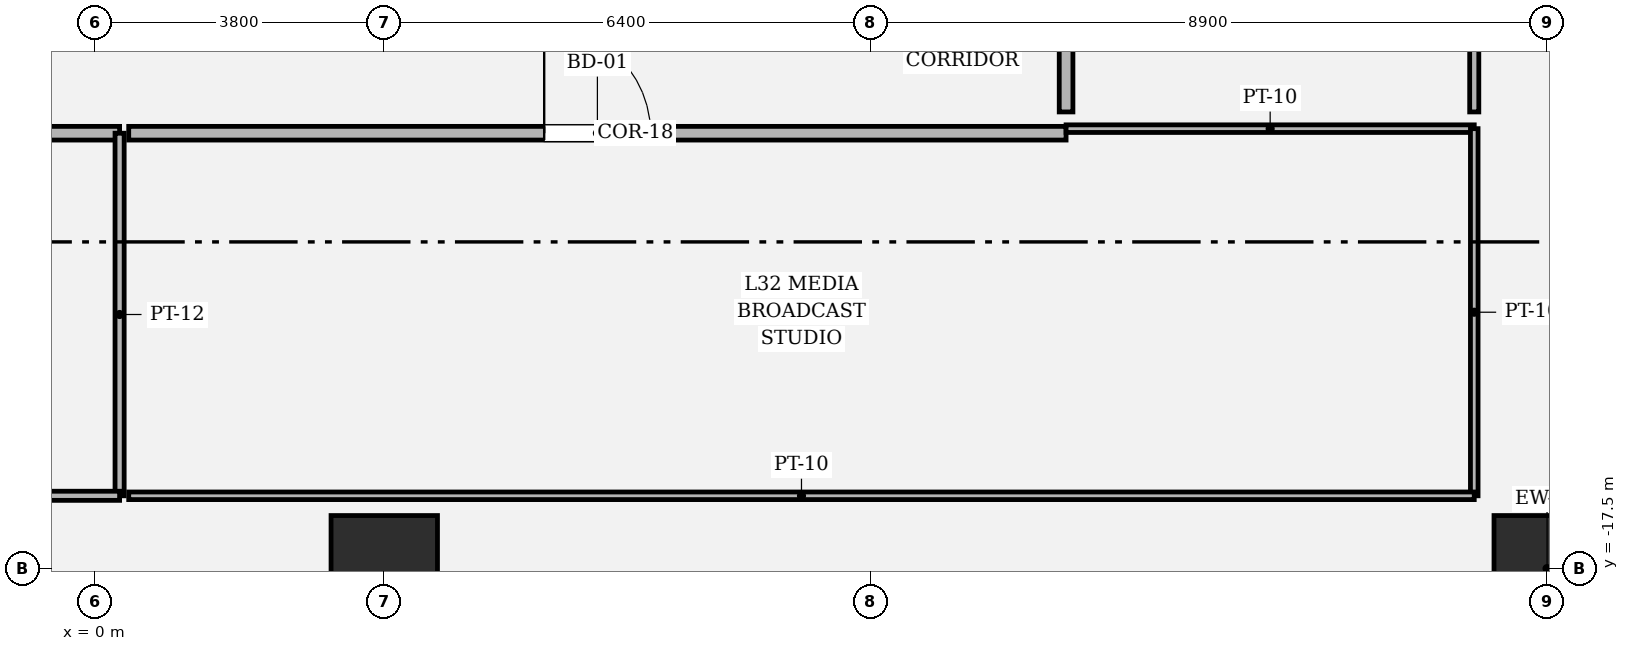
"""IFC4 building model, lengths in metres.
Left out: names, types, materials, properties, quantities, classifications, styles, units other than length and angle.
Written with IfcOpenShell. Run it as: python <this file> out.ifc"""

import sys

from ifc_helpers import new_model, si_unit, direction, frame, frame_2d, origin, origin_2d, place, context, subcontext, project, spatial, rectangle, hollow_rectangle, extrude, element, fill, save


model = new_model("IFC4")
c1 = context("Model", 3, precision=1e-05, world=origin(), true_north=direction((0.0, 1.0)))
c2 = subcontext(c1, "Body", "Model", "MODEL_VIEW")
j1 = project(units=[si_unit("LENGTHUNIT", "METRE"), si_unit("PLANEANGLEUNIT", "RADIAN")], contexts=[c1])
p1 = place(None, origin())
s1 = spatial("IfcSite", under=j1, at=p1, CompositionType="ELEMENT")
p2 = place(p1, origin())
s2 = spatial("IfcBuilding", under=s1, at=p2, CompositionType="ELEMENT")
p3 = place(p2, frame((0.0, 0.0, 139.8)))
s3 = spatial("IfcBuildingStorey", under=s2, at=p3, CompositionType="ELEMENT", Elevation=139.8)
for number, where, z_axis, x_axis in (
    (1, (3.8, -17.5, 0.0), (0.0, 0.0, 1.0), (1.0, 0.0, 0.0)),
    (2, (19.1, -17.5, 0.0), (0.0, 0.0, 1.0), (1.0, 0.0, 0.0)),
):
    element("IfcColumn", number, at=place(p3, frame(where, z_axis=z_axis, x_axis=x_axis)), inside=s3, PredefinedType="COLUMN", context=c2, shape_type="SweptSolid", body=[
        extrude(hollow_rectangle(XDim=1.4, YDim=1.4, WallThickness=0.042, at=origin_2d()), origin(), (0.0, 0.0, 1.0), 4.05),
    ])
p4 = place(p3, frame((18.549, -18.047, 0.0), z_axis=(0.0, 0.0, 1.0), x_axis=(0.707106781187, 0.707106781187, 0.0)))
e3 = element("IfcWall", 3, at=p4, inside=s3, PredefinedType="SOLIDWALL", context=c2, shape_type="SweptSolid", body=[
    extrude(rectangle(XDim=1.552, YDim=0.32, at=frame_2d((0.776, 0.0))), origin(), (0.0, 0.0, 1.0), 3.174),
])
p5 = place(p3, frame((-12.77, -11.77, 0.0), z_axis=(0.0, 0.0, 1.0), x_axis=(1.0, 0.0, 0.0)))
e4 = element("IfcWall", 4, at=p5, inside=s3, PredefinedType="PARTITIONING", context=c2, shape_type="SweptSolid", body=[
    extrude(rectangle(XDim=13.088, YDim=0.18, at=frame_2d((6.544, 0.0))), origin(), (0.0, 0.0, 1.0), 3.174),
])
p6 = place(p5, frame((6.019, 0.0, 0.0)))
e5 = element("IfcOpeningElement", 5, at=p6, cuts=e4, PredefinedType="OPENING", context=c2, shape_type="SweptSolid", body=[
    extrude(rectangle(XDim=1.05, YDim=2.2, at=frame_2d((0.525, 1.1))), frame((0.0, 0.1, 0.0), z_axis=(0.0, -1.0, 0.0), x_axis=(1.0, 0.0, 0.0)), (0.0, 0.0, 1.0), 0.2),
])
p7 = place(p3, frame((0.318, -11.77, 0.0), z_axis=(0.0, 0.0, 1.0), x_axis=(0.0, -1.0, 0.0)))
e6 = element("IfcWall", 6, at=p7, inside=s3, PredefinedType="PARTITIONING", context=c2, shape_type="SweptSolid", body=[
    extrude(rectangle(XDim=4.77, YDim=0.12, at=frame_2d((2.385, 0.0))), origin(), (0.0, 0.0, 1.0), 3.83),
])
p8 = place(p3, frame((0.318, -16.54, 0.0), z_axis=(0.0, 0.0, 1.0), x_axis=(-1.0, 0.0, 0.0)))
e7 = element("IfcWall", 7, at=p8, inside=s3, PredefinedType="PARTITIONING", context=c2, shape_type="SweptSolid", body=[
    extrude(rectangle(XDim=24.358, YDim=0.12, at=frame_2d((12.179, 0.0))), origin(), (0.0, 0.0, 1.0), 3.174),
])
p9 = place(p3, frame((0.438, -11.77, 0.0), z_axis=(0.0, 0.0, 1.0), x_axis=(1.0, 0.0, 0.0)))
e8 = element("IfcWall", 8, at=p9, inside=s3, PredefinedType="PARTITIONING", context=c2, shape_type="SweptSolid", body=[
    extrude(rectangle(XDim=12.332, YDim=0.18, at=frame_2d((6.166, 0.0))), origin(), (0.0, 0.0, 1.0), 3.174),
])
p10 = place(p9, frame((5.466, 0.0, 0.0)))
e9 = element("IfcOpeningElement", 9, at=p10, cuts=e8, PredefinedType="OPENING", context=c2, shape_type="SweptSolid", body=[
    extrude(rectangle(XDim=1.4, YDim=2.25, at=frame_2d((0.7, 1.125))), frame((0.0, 0.1, 0.0), z_axis=(0.0, -1.0, 0.0), x_axis=(1.0, 0.0, 0.0)), (0.0, 0.0, 1.0), 0.2),
])
p11 = place(p3, frame((12.77, -11.71, 0.0), z_axis=(0.0, 0.0, 1.0), x_axis=(1.0, 0.0, 0.0)))
e10 = element("IfcWall", 10, at=p11, inside=s3, PredefinedType="PARTITIONING", context=c2, shape_type="SweptSolid", body=[
    extrude(rectangle(XDim=5.37, YDim=0.1, at=frame_2d((2.685, 0.0))), origin(), (0.0, 0.0, 1.0), 3.424),
])
p12 = place(p3, frame((18.14, -11.71, 0.0), z_axis=(0.0, 0.0, 1.0), x_axis=(0.0, -1.0, 0.0)))
e11 = element("IfcWall", 11, at=p12, inside=s3, PredefinedType="PARTITIONING", context=c2, shape_type="SweptSolid", body=[
    extrude(rectangle(XDim=4.83, YDim=0.1, at=frame_2d((2.415, 0.0))), origin(), (0.0, 0.0, 1.0), 3.424),
])
p13 = place(p3, frame((18.14, -16.54, 0.0), z_axis=(0.0, 0.0, 1.0), x_axis=(-1.0, 0.0, 0.0)))
e12 = element("IfcWall", 12, at=p13, inside=s3, PredefinedType="PARTITIONING", context=c2, shape_type="SweptSolid", body=[
    extrude(rectangle(XDim=17.702, YDim=0.1, at=frame_2d((8.851, 0.0))), origin(), (0.0, 0.0, 1.0), 3.174),
])
p14 = place(p3, frame((18.14, -1.67, 0.0), z_axis=(0.0, 0.0, 1.0), x_axis=(0.0, -1.0, 0.0)))
e13 = element("IfcWall", 13, at=p14, inside=s3, PredefinedType="PARTITIONING", context=c2, shape_type="SweptSolid", body=[
    extrude(rectangle(XDim=9.82, YDim=0.12, at=frame_2d((4.91, 0.0))), origin(), (0.0, 0.0, 1.0), 3.174),
])
p15 = place(p3, frame((12.77, -11.49, 0.0), z_axis=(0.0, 0.0, 1.0), x_axis=(0.0, 1.0, 0.0)))
e14 = element("IfcWall", 14, at=p15, inside=s3, PredefinedType="PARTITIONING", context=c2, shape_type="SweptSolid", body=[
    extrude(rectangle(XDim=9.82, YDim=0.18, at=frame_2d((4.91, 0.0))), origin(), (0.0, 0.0, 1.0), 3.174),
])
p16 = place(p15, frame((4.385, 0.0, 0.0)))
e15 = element("IfcOpeningElement", 15, at=p16, cuts=e14, PredefinedType="OPENING", context=c2, shape_type="SweptSolid", body=[
    extrude(rectangle(XDim=1.05, YDim=2.2, at=frame_2d((0.525, 1.1))), frame((0.0, 0.1, 0.0), z_axis=(0.0, -1.0, 0.0), x_axis=(1.0, 0.0, 0.0)), (0.0, 0.0, 1.0), 0.2),
])
p17 = place(p10, origin())
e16 = element("IfcDoor", 16, at=p17, inside=s3, OperationType="SINGLE_SWING_LEFT", PredefinedType="DOOR", context=c2, shape_type="SweptSolid", body=[
    extrude(rectangle(XDim=1.4, YDim=2.25, at=frame_2d((0.7, 1.125))), frame((0.0, 0.025, 0.0), z_axis=(0.0, -1.0, 0.0), x_axis=(1.0, 0.0, 0.0)), (0.0, 0.0, 1.0), 0.05),
])
fill(e9, e16)
save(model, sys.argv[1])
